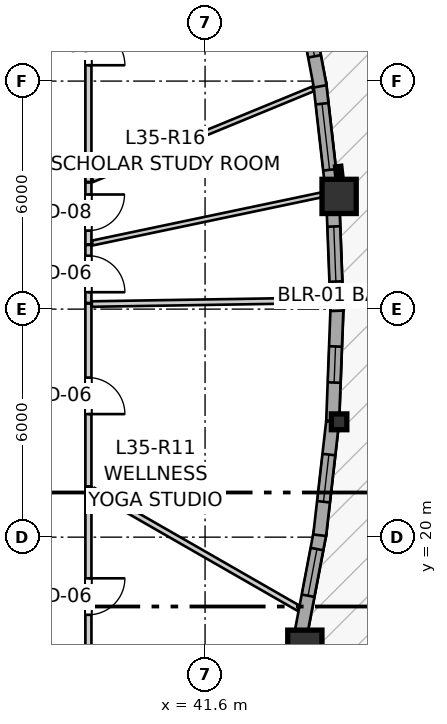
"""IFC4 building model, lengths in metres.
Left out: names, types, materials, properties, quantities, classifications, styles, units other than length and angle.
Written with IfcOpenShell. Run it as: python <this file> out.ifc"""

import sys

from ifc_helpers import new_model, si_unit, direction, frame, frame_2d, origin, origin_2d, place, context, subcontext, project, spatial, rectangle, i_section, extrude, source, transform, mapped, element, fill, save


model = new_model("IFC4")
c1 = context("Model", 3, precision=1e-05, world=origin(), true_north=direction((0.0, 1.0)))
c2 = subcontext(c1, "Body", "Model", "MODEL_VIEW")
j1 = project(units=[si_unit("LENGTHUNIT", "METRE"), si_unit("PLANEANGLEUNIT", "RADIAN")], contexts=[c1])
p1 = place(None, origin())
s1 = spatial("IfcSite", under=j1, at=p1, CompositionType="ELEMENT")
p2 = place(p1, origin())
s2 = spatial("IfcBuilding", under=s1, at=p2, CompositionType="ELEMENT")
p3 = place(p2, frame((0.0, 0.0, 118.4)))
s3 = spatial("IfcBuildingStorey", under=s2, at=p3, CompositionType="ELEMENT", Elevation=118.4)
m1 = source(origin(), c2, "Body", "SweptSolid", [
    extrude(rectangle(XDim=0.9, YDim=0.9, at=origin_2d()), origin(), (0.0, 0.0, 1.0), 2.95),
])
p4 = place(p3, frame((44.226, 17.104, 0.0), z_axis=(0.0, 0.0, 1.0), x_axis=(1.0, 0.0, 0.0)))
e1 = element("IfcColumn", 1, at=p4, inside=s3, PredefinedType="COLUMN", context=c2, shape_type="MappedRepresentation", body=[
    mapped(m1, transform((0.0, 0.0, 0.0), x_axis=(1.0, 0.0, 0.0), y_axis=(0.0, 1.0, 0.0), z_axis=(0.0, 0.0, 1.0), scale=1.0)),
])
m2 = source(origin(), c2, "Body", "SweptSolid", [
    extrude(i_section(OverallWidth=0.406, OverallDepth=0.416, WebThickness=0.027, FlangeThickness=0.044, FilletRadius=0.015, at=origin_2d()), origin(), (0.0, 0.0, 1.0), 2.95),
])
p5 = place(p3, frame((45.127, 23.034, 0.0), z_axis=(0.0, 0.0, 1.0), x_axis=(1.0, 0.0, 0.0)))
e2 = element("IfcColumn", 2, at=p5, inside=s3, PredefinedType="PILASTER", context=c2, shape_type="MappedRepresentation", body=[
    mapped(m2, transform((0.0, 0.0, 0.0), x_axis=(1.0, 0.0, 0.0), y_axis=(0.0, 1.0, 0.0), z_axis=(0.0, 0.0, 1.0), scale=1.0)),
])
p6 = place(p3, frame((45.127, 28.966, 0.0), z_axis=(0.0, 0.0, 1.0), x_axis=(1.0, 0.0, 0.0)))
e3 = element("IfcColumn", 3, at=p6, inside=s3, PredefinedType="COLUMN", context=c2, shape_type="MappedRepresentation", body=[
    mapped(m1, transform((0.0, 0.0, 0.0), x_axis=(1.0, 0.0, 0.0), y_axis=(0.0, 1.0, 0.0), z_axis=(0.0, 0.0, 1.0), scale=1.0)),
])
p7 = place(p3, frame((44.101, 17.361, 0.0), z_axis=(0.0, 0.0, 1.0), x_axis=(0.186739007234, 0.982409559795, 0.0)))
e4 = element("IfcWall", 4, at=p7, inside=s3, PredefinedType="SOLIDWALL", context=c2, shape_type="SweptSolid", body=[
    extrude(rectangle(XDim=2.827, YDim=0.34, at=frame_2d((1.413, 0.0))), origin(), (0.0, 0.0, 1.0), 2.48),
])
p8 = place(p7, frame((1.118, 0.0, 0.82)))
e5 = element("IfcOpeningElement", 5, at=p8, cuts=e4, PredefinedType="OPENING", context=c2, shape_type="SweptSolid", body=[
    extrude(rectangle(XDim=1.25, YDim=1.35, at=frame_2d((0.625, 0.675))), frame((0.0, 0.18, 0.0), z_axis=(0.0, -1.0, 0.0), x_axis=(1.0, 0.0, 0.0)), (0.0, 0.0, 1.0), 0.36),
])
p9 = place(p3, frame((44.616, 20.05, 0.0), z_axis=(0.0, 0.0, 1.0), x_axis=(0.113250801133, 0.993566432627, 0.0)))
e6 = element("IfcWall", 6, at=p9, inside=s3, PredefinedType="SOLIDWALL", context=c2, shape_type="SweptSolid", body=[
    extrude(rectangle(XDim=3.003, YDim=0.34, at=frame_2d((1.501, 0.0))), origin(), (0.0, 0.0, 1.0), 2.48),
])
p10 = place(p9, frame((0.886, 0.0, 0.82)))
e7 = element("IfcOpeningElement", 7, at=p10, cuts=e6, PredefinedType="OPENING", context=c2, shape_type="SweptSolid", body=[
    extrude(rectangle(XDim=1.25, YDim=1.35, at=frame_2d((0.625, 0.675))), frame((0.0, 0.18, 0.0), z_axis=(0.0, -1.0, 0.0), x_axis=(1.0, 0.0, 0.0)), (0.0, 0.0, 1.0), 0.36),
])
p11 = place(p3, frame((44.958, 23.061, 0.0), z_axis=(0.0, 0.0, 1.0), x_axis=(0.037940097137, 0.999280015326, 0.0)))
e8 = element("IfcWall", 8, at=p11, inside=s3, PredefinedType="SOLIDWALL", context=c2, shape_type="SweptSolid", body=[
    extrude(rectangle(XDim=2.986, YDim=0.34, at=frame_2d((1.493, 0.0))), origin(), (0.0, 0.0, 1.0), 2.48),
])
p12 = place(p11, frame((1.008, 0.0, 0.82)))
e9 = element("IfcOpeningElement", 9, at=p12, cuts=e8, PredefinedType="OPENING", context=c2, shape_type="SweptSolid", body=[
    extrude(rectangle(XDim=0.95, YDim=1.35, at=frame_2d((0.475, 0.675))), frame((0.0, 0.18, 0.0), z_axis=(0.0, -1.0, 0.0), x_axis=(1.0, 0.0, 0.0)), (0.0, 0.0, 1.0), 0.36),
])
p13 = place(p3, frame((45.071, 25.956, 0.0), z_axis=(0.0, 0.0, 1.0), x_axis=(-0.037997361734, 0.999277839493, 0.0)))
e10 = element("IfcWall", 10, at=p13, inside=s3, PredefinedType="SOLIDWALL", context=c2, shape_type="SweptSolid", body=[
    extrude(rectangle(XDim=2.776, YDim=0.34, at=frame_2d((1.388, 0.0))), origin(), (0.0, 0.0, 1.0), 2.48),
])
p14 = place(p13, frame((0.771, 0.0, 0.82)))
e11 = element("IfcOpeningElement", 11, at=p14, cuts=e10, PredefinedType="OPENING", context=c2, shape_type="SweptSolid", body=[
    extrude(rectangle(XDim=1.45, YDim=1.25, at=frame_2d((0.725, 0.625))), frame((0.0, 0.18, 0.0), z_axis=(0.0, -1.0, 0.0), x_axis=(1.0, 0.0, 0.0)), (0.0, 0.0, 1.0), 0.36),
])
p15 = place(p3, frame((44.932, 29.175, 0.0), z_axis=(0.0, 0.0, 1.0), x_axis=(-0.113290188042, 0.993561942354, 0.0)))
e12 = element("IfcWall", 12, at=p15, inside=s3, PredefinedType="SOLIDWALL", context=c2, shape_type="SweptSolid", body=[
    extrude(rectangle(XDim=2.793, YDim=0.34, at=frame_2d((1.396, 0.0))), origin(), (0.0, 0.0, 1.0), 2.48),
])
p16 = place(p15, frame((0.493, 0.0, 0.82)))
e13 = element("IfcOpeningElement", 13, at=p16, cuts=e12, PredefinedType="OPENING", context=c2, shape_type="SweptSolid", body=[
    extrude(rectangle(XDim=1.75, YDim=1.3, at=frame_2d((0.875, 0.65))), frame((0.0, 0.18, 0.0), z_axis=(0.0, -1.0, 0.0), x_axis=(1.0, 0.0, 0.0)), (0.0, 0.0, 1.0), 0.36),
])
p17 = place(p3, frame((44.629, 31.862, 0.0), z_axis=(0.0, 0.0, 1.0), x_axis=(-0.186690909565, 0.982418701108, 0.0)))
e14 = element("IfcWall", 14, at=p17, inside=s3, PredefinedType="SOLIDWALL", context=c2, shape_type="SweptSolid", body=[
    extrude(rectangle(XDim=3.037, YDim=0.34, at=frame_2d((1.518, 0.0))), origin(), (0.0, 0.0, 1.0), 2.48),
])
p18 = place(p17, frame((0.803, 0.0, 0.82)))
e15 = element("IfcOpeningElement", 15, at=p18, cuts=e14, PredefinedType="OPENING", context=c2, shape_type="SweptSolid", body=[
    extrude(rectangle(XDim=1.45, YDim=1.25, at=frame_2d((0.725, 0.625))), frame((0.0, 0.18, 0.0), z_axis=(0.0, -1.0, 0.0), x_axis=(1.0, 0.0, 0.0)), (0.0, 0.0, 1.0), 0.36),
])
p19 = place(p3, frame((38.53, 36.43, 0.0), z_axis=(0.0, 0.0, 1.0), x_axis=(0.0, -1.0, 0.0)))
e16 = element("IfcWall", 16, at=p19, inside=s3, PredefinedType="PARTITIONING", context=c2, shape_type="SweptSolid", body=[
    extrude(rectangle(XDim=7.083, YDim=0.16, at=frame_2d((3.542, 0.0))), origin(), (0.0, 0.0, 1.0), 2.588),
])
p20 = place(p19, frame((3.053, 0.0, 0.0)))
e17 = element("IfcOpeningElement", 17, at=p20, cuts=e16, PredefinedType="OPENING", context=c2, shape_type="SweptSolid", body=[
    extrude(rectangle(XDim=0.96, YDim=2.1, at=frame_2d((0.48, 1.05))), frame((0.0, 0.09, 0.0), z_axis=(0.0, -1.0, 0.0), x_axis=(1.0, 0.0, 0.0)), (0.0, 0.0, 1.0), 0.18),
])
p21 = place(p3, frame((38.53, 21.321, 0.0), z_axis=(0.0, 0.0, 1.0), x_axis=(0.0, -1.0, 0.0)))
e18 = element("IfcWall", 18, at=p21, inside=s3, PredefinedType="PARTITIONING", context=c2, shape_type="SweptSolid", body=[
    extrude(rectangle(XDim=5.751, YDim=0.16, at=frame_2d((2.875, 0.0))), origin(), (0.0, 0.0, 1.0), 2.95),
])
p22 = place(p21, frame((2.404, 0.0, 0.0)))
e19 = element("IfcOpeningElement", 19, at=p22, cuts=e18, PredefinedType="OPENING", context=c2, shape_type="SweptSolid", body=[
    extrude(rectangle(XDim=0.96, YDim=2.1, at=frame_2d((0.48, 1.05))), frame((0.0, 0.09, 0.0), z_axis=(0.0, -1.0, 0.0), x_axis=(1.0, 0.0, 0.0)), (0.0, 0.0, 1.0), 0.18),
])
p23 = place(p3, frame((38.53, 26.147, 0.0), z_axis=(0.0, 0.0, 1.0), x_axis=(0.0, -1.0, 0.0)))
e20 = element("IfcWall", 20, at=p23, inside=s3, PredefinedType="PARTITIONING", context=c2, shape_type="SweptSolid", body=[
    extrude(rectangle(XDim=4.811, YDim=0.16, at=frame_2d((2.406, 0.0))), origin(), (0.0, 0.0, 1.0), 2.95),
])
p24 = place(p23, frame((1.949, 0.0, 0.0)))
e21 = element("IfcOpeningElement", 21, at=p24, cuts=e20, PredefinedType="OPENING", context=c2, shape_type="SweptSolid", body=[
    extrude(rectangle(XDim=0.96, YDim=2.1, at=frame_2d((0.48, 1.05))), frame((0.0, 0.09, 0.0), z_axis=(0.0, -1.0, 0.0), x_axis=(1.0, 0.0, 0.0)), (0.0, 0.0, 1.0), 0.18),
])
p25 = place(p3, frame((38.53, 29.332, 0.0), z_axis=(0.0, 0.0, 1.0), x_axis=(0.0, -1.0, 0.0)))
e22 = element("IfcWall", 22, at=p25, inside=s3, PredefinedType="PARTITIONING", context=c2, shape_type="SweptSolid", body=[
    extrude(rectangle(XDim=1.629, YDim=0.16, at=frame_2d((0.814, 0.0))), origin(), (0.0, 0.0, 1.0), 2.95),
])
p26 = place(p25, frame((0.316, 0.0, 0.0)))
e23 = element("IfcOpeningElement", 23, at=p26, cuts=e22, PredefinedType="OPENING", context=c2, shape_type="SweptSolid", body=[
    extrude(rectangle(XDim=0.95, YDim=2.1, at=frame_2d((0.475, 1.05))), frame((0.0, 0.09, 0.0), z_axis=(0.0, -1.0, 0.0), x_axis=(1.0, 0.0, 0.0)), (0.0, 0.0, 1.0), 0.18),
])
p27 = place(p3, frame((38.53, 27.688, 0.0), z_axis=(0.0, 0.0, 1.0), x_axis=(0.0, -1.0, 0.0)))
e24 = element("IfcWall", 24, at=p27, inside=s3, PredefinedType="PARTITIONING", context=c2, shape_type="SweptSolid", body=[
    extrude(rectangle(XDim=1.526, YDim=0.16, at=frame_2d((0.763, 0.0))), origin(), (0.0, 0.0, 1.0), 2.95),
])
p28 = place(p27, frame((0.283, 0.0, 0.0)))
e25 = element("IfcOpeningElement", 25, at=p28, cuts=e24, PredefinedType="OPENING", context=c2, shape_type="SweptSolid", body=[
    extrude(rectangle(XDim=0.96, YDim=2.1, at=frame_2d((0.48, 1.05))), frame((0.0, 0.09, 0.0), z_axis=(0.0, -1.0, 0.0), x_axis=(1.0, 0.0, 0.0)), (0.0, 0.0, 1.0), 0.18),
])
p29 = place(p3, frame((38.642, 29.41, 0.0), z_axis=(0.0, 0.0, 1.0), x_axis=(0.924865201518, 0.380295094659, 0.0)))
e26 = element("IfcWall", 26, at=p29, inside=s3, PredefinedType="PARTITIONING", context=c2, shape_type="SweptSolid", body=[
    extrude(rectangle(XDim=6.266, YDim=0.13, at=frame_2d((3.133, 0.0))), origin(), (0.0, 0.0, 1.0), 2.95),
])
p30 = place(p3, frame((38.653, 21.233, 0.0), z_axis=(0.0, 0.0, 1.0), x_axis=(0.86726592845, -0.49784516604, 0.0)))
e27 = element("IfcWall", 27, at=p30, inside=s3, PredefinedType="PARTITIONING", context=c2, shape_type="SweptSolid", body=[
    extrude(rectangle(XDim=6.237, YDim=0.145, at=frame_2d((3.119, 0.0))), origin(), (0.0, 0.0, 1.0), 2.95),
])
p31 = place(p3, frame((38.631, 27.739, 0.0), z_axis=(0.0, 0.0, 1.0), x_axis=(0.978654667538, 0.205511658323, 0.0)))
e28 = element("IfcWall", 28, at=p31, inside=s3, PredefinedType="PARTITIONING", context=c2, shape_type="SweptSolid", body=[
    extrude(rectangle(XDim=6.29, YDim=0.13, at=frame_2d((3.145, 0.0))), origin(), (0.0, 0.0, 1.0), 2.368),
])
p32 = place(p3, frame((38.619, 26.133, 0.0), z_axis=(0.0, 0.0, 1.0), x_axis=(0.999869130012, 0.016177850558, 0.0)))
e29 = element("IfcWall", 29, at=p32, inside=s3, PredefinedType="PARTITIONING", context=c2, shape_type="SweptSolid", body=[
    extrude(rectangle(XDim=6.263, YDim=0.145, at=frame_2d((3.131, 0.0))), origin(), (0.0, 0.0, 1.0), 2.95),
])
m3 = source(origin(), c2, "Body", "SweptSolid", [
    extrude(rectangle(XDim=1.25, YDim=1.35, at=frame_2d((0.625, 0.675))), frame((0.0, 0.03, 0.0), z_axis=(0.0, -1.0, 0.0), x_axis=(1.0, 0.0, 0.0)), (0.0, 0.0, 1.0), 0.06),
])
p33 = place(p8, origin())
e30 = element("IfcWindow", 30, at=p33, inside=s3, PartitioningType="SINGLE_PANEL", PredefinedType="WINDOW", context=c2, shape_type="MappedRepresentation", body=[
    mapped(m3, transform((0.0, 0.0, 0.0), x_axis=(1.0, 0.0, 0.0), y_axis=(0.0, 1.0, 0.0), z_axis=(0.0, 0.0, 1.0), scale=1.0)),
])
fill(e5, e30)
p34 = place(p10, origin())
e31 = element("IfcWindow", 31, at=p34, inside=s3, PartitioningType="SINGLE_PANEL", PredefinedType="WINDOW", context=c2, shape_type="MappedRepresentation", body=[
    mapped(m3, transform((0.0, 0.0, 0.0), x_axis=(1.0, 0.0, 0.0), y_axis=(0.0, 1.0, 0.0), z_axis=(0.0, 0.0, 1.0), scale=1.0)),
])
fill(e7, e31)
m4 = source(origin(), c2, "Body", "SweptSolid", [
    extrude(rectangle(XDim=0.95, YDim=1.35, at=frame_2d((0.475, 0.675))), frame((0.0, 0.03, 0.0), z_axis=(0.0, -1.0, 0.0), x_axis=(1.0, 0.0, 0.0)), (0.0, 0.0, 1.0), 0.06),
])
p35 = place(p12, origin())
e32 = element("IfcWindow", 32, at=p35, inside=s3, PartitioningType="SINGLE_PANEL", PredefinedType="WINDOW", context=c2, shape_type="MappedRepresentation", body=[
    mapped(m4, transform((0.0, 0.0, 0.0), x_axis=(1.0, 0.0, 0.0), y_axis=(0.0, 1.0, 0.0), z_axis=(0.0, 0.0, 1.0), scale=1.0)),
])
fill(e9, e32)
m5 = source(origin(), c2, "Body", "SweptSolid", [
    extrude(rectangle(XDim=1.45, YDim=1.25, at=frame_2d((0.725, 0.625))), frame((0.0, 0.03, 0.0), z_axis=(0.0, -1.0, 0.0), x_axis=(1.0, 0.0, 0.0)), (0.0, 0.0, 1.0), 0.06),
])
p36 = place(p14, origin())
e33 = element("IfcWindow", 33, at=p36, inside=s3, PartitioningType="SINGLE_PANEL", PredefinedType="WINDOW", context=c2, shape_type="MappedRepresentation", body=[
    mapped(m5, transform((0.0, 0.0, 0.0), x_axis=(1.0, 0.0, 0.0), y_axis=(0.0, 1.0, 0.0), z_axis=(0.0, 0.0, 1.0), scale=1.0)),
])
fill(e11, e33)
m6 = source(origin(), c2, "Body", "SweptSolid", [
    extrude(rectangle(XDim=1.75, YDim=1.3, at=frame_2d((0.875, 0.65))), frame((0.0, 0.03, 0.0), z_axis=(0.0, -1.0, 0.0), x_axis=(1.0, 0.0, 0.0)), (0.0, 0.0, 1.0), 0.06),
])
p37 = place(p16, origin())
e34 = element("IfcWindow", 34, at=p37, inside=s3, PartitioningType="SINGLE_PANEL", PredefinedType="WINDOW", context=c2, shape_type="MappedRepresentation", body=[
    mapped(m6, transform((0.0, 0.0, 0.0), x_axis=(1.0, 0.0, 0.0), y_axis=(0.0, 1.0, 0.0), z_axis=(0.0, 0.0, 1.0), scale=1.0)),
])
fill(e13, e34)
p38 = place(p18, origin())
e35 = element("IfcWindow", 35, at=p38, inside=s3, PartitioningType="SINGLE_PANEL", PredefinedType="WINDOW", context=c2, shape_type="MappedRepresentation", body=[
    mapped(m5, transform((0.0, 0.0, 0.0), x_axis=(1.0, 0.0, 0.0), y_axis=(0.0, 1.0, 0.0), z_axis=(0.0, 0.0, 1.0), scale=1.0)),
])
fill(e15, e35)
m7 = source(origin(), c2, "Body", "SweptSolid", [
    extrude(rectangle(XDim=0.96, YDim=2.1, at=frame_2d((0.48, 1.05))), frame((0.0, 0.025, 0.0), z_axis=(0.0, -1.0, 0.0), x_axis=(1.0, 0.0, 0.0)), (0.0, 0.0, 1.0), 0.05),
])
p39 = place(p20, origin())
e36 = element("IfcDoor", 36, at=p39, inside=s3, OperationType="SINGLE_SWING_RIGHT", PredefinedType="DOOR", context=c2, shape_type="MappedRepresentation", body=[
    mapped(m7, transform((0.0, 0.0, 0.0), x_axis=(1.0, 0.0, 0.0), y_axis=(0.0, 1.0, 0.0), z_axis=(0.0, 0.0, 1.0), scale=1.0)),
])
fill(e17, e36)
p40 = place(p22, origin())
e37 = element("IfcDoor", 37, at=p40, inside=s3, OperationType="SINGLE_SWING_LEFT", PredefinedType="DOOR", context=c2, shape_type="MappedRepresentation", body=[
    mapped(m7, transform((0.0, 0.0, 0.0), x_axis=(1.0, 0.0, 0.0), y_axis=(0.0, 1.0, 0.0), z_axis=(0.0, 0.0, 1.0), scale=1.0)),
])
fill(e19, e37)
p41 = place(p24, origin())
e38 = element("IfcDoor", 38, at=p41, inside=s3, OperationType="SINGLE_SWING_RIGHT", PredefinedType="DOOR", context=c2, shape_type="MappedRepresentation", body=[
    mapped(m7, transform((0.0, 0.0, 0.0), x_axis=(1.0, 0.0, 0.0), y_axis=(0.0, 1.0, 0.0), z_axis=(0.0, 0.0, 1.0), scale=1.0)),
])
fill(e21, e38)
m8 = source(origin(), c2, "Body", "SweptSolid", [
    extrude(rectangle(XDim=0.95, YDim=2.1, at=frame_2d((0.475, 1.05))), frame((0.0, 0.025, 0.0), z_axis=(0.0, -1.0, 0.0), x_axis=(1.0, 0.0, 0.0)), (0.0, 0.0, 1.0), 0.05),
])
p42 = place(p26, origin())
e39 = element("IfcDoor", 39, at=p42, inside=s3, OperationType="SINGLE_SWING_LEFT", PredefinedType="DOOR", context=c2, shape_type="MappedRepresentation", body=[
    mapped(m8, transform((0.0, 0.0, 0.0), x_axis=(1.0, 0.0, 0.0), y_axis=(0.0, 1.0, 0.0), z_axis=(0.0, 0.0, 1.0), scale=1.0)),
])
fill(e23, e39)
p43 = place(p28, origin())
e40 = element("IfcDoor", 40, at=p43, inside=s3, OperationType="SINGLE_SWING_RIGHT", PredefinedType="DOOR", context=c2, shape_type="MappedRepresentation", body=[
    mapped(m7, transform((0.0, 0.0, 0.0), x_axis=(1.0, 0.0, 0.0), y_axis=(0.0, 1.0, 0.0), z_axis=(0.0, 0.0, 1.0), scale=1.0)),
])
fill(e25, e40)
save(model, sys.argv[1])
